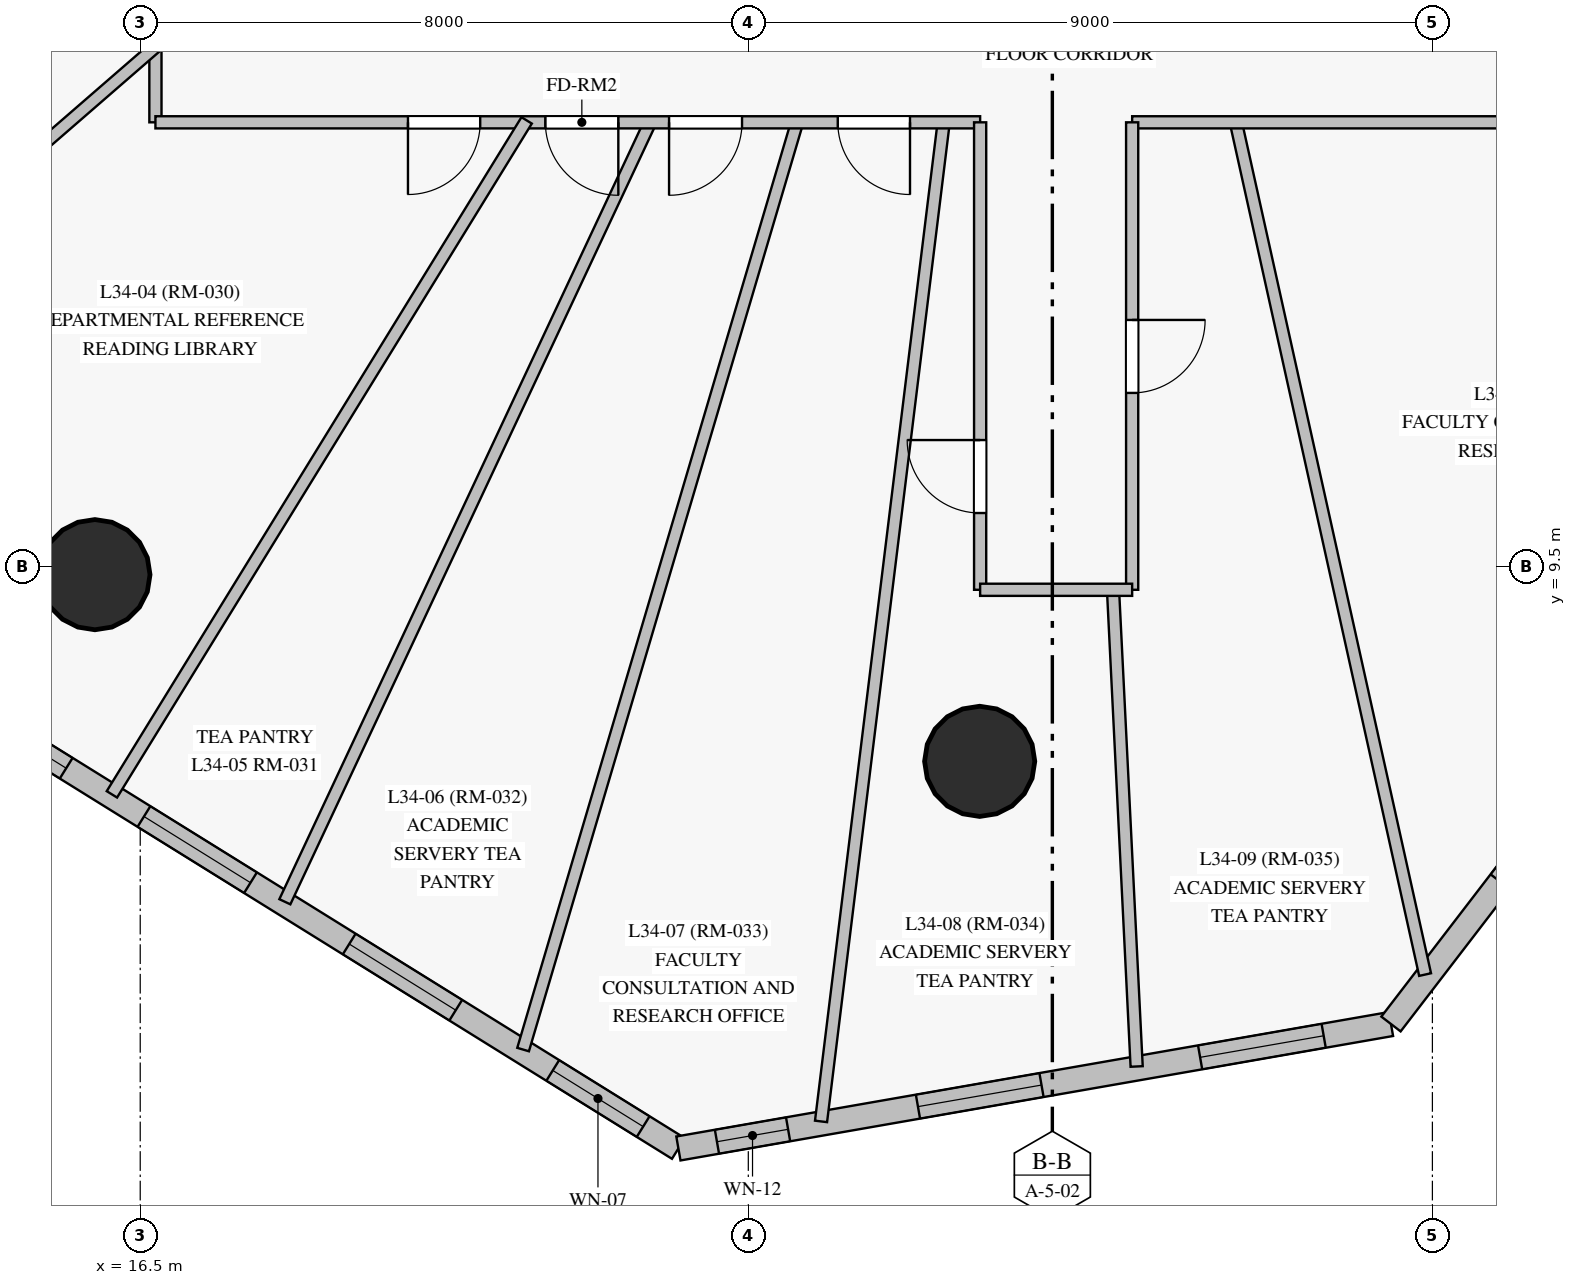
"""IFC4 building model, lengths in metres.
Left out: names, types, materials, properties, quantities, classifications, styles, units other than length and angle.
Written with IfcOpenShell. Run it as: python <this file> out.ifc"""

import sys

from ifc_helpers import new_model, si_unit, direction, frame, frame_2d, origin, origin_with_axes, origin_2d, place, context, subcontext, project, spatial, rectangle, circle, extrude, source, transform, mapped, element, fill, save


model = new_model("IFC4")
c1 = context("Model", 3, precision=1e-05, world=origin(), true_north=direction((0.0, 1.0)))
c2 = subcontext(c1, "Body", "Model", "MODEL_VIEW")
j1 = project(units=[si_unit("LENGTHUNIT", "METRE"), si_unit("PLANEANGLEUNIT", "RADIAN")], contexts=[c1])
p1 = place(None, origin())
s1 = spatial("IfcSite", under=j1, at=p1, CompositionType="ELEMENT")
p2 = place(p1, origin())
s2 = spatial("IfcBuilding", under=s1, at=p2, CompositionType="ELEMENT")
p3 = place(p2, frame((0.0, 0.0, 123.65)))
s3 = spatial("IfcBuildingStorey", under=s2, at=p3, CompositionType="ELEMENT", Elevation=123.65)
m1 = source(origin_with_axes(), c2, "Body", "SweptSolid", [
    extrude(circle(Radius=0.725, at=origin_2d()), origin(), (0.0, 0.0, 1.0), 3.05),
])
for number, where, z_axis, x_axis in (
    (1, (15.904, 9.399, 0.0), (0.0, 0.0, 1.0), (1.0, 0.0, 0.0)),
    (2, (27.544, 6.943, 0.0), (0.0, 0.0, 1.0), (1.0, 0.0, 0.0)),
):
    element("IfcColumn", number, at=place(p3, frame(where, z_axis=z_axis, x_axis=x_axis)), inside=s3, PredefinedType="COLUMN", context=c2, shape_type="MappedRepresentation", body=[
        mapped(m1, transform((0.0, 0.0, 0.0), scale=1.0)),
    ])
p4 = place(p3, frame((13.486, 8.12, 0.0), z_axis=(0.0, 0.0, 1.0), x_axis=(0.849467759899, -0.527640526204, 0.0)))
e3 = element("IfcWall", 3, at=p4, inside=s3, PredefinedType="SOLIDWALL", context=c2, shape_type="SweptSolid", body=[
    extrude(rectangle(XDim=11.884, YDim=0.32, at=frame_2d((5.942, 0.0))), origin(), (0.0, 0.0, 1.0), 2.825),
])
p5 = place(p4, frame((0.752, 0.0, 0.85)))
e4 = element("IfcOpeningElement", 4, at=p5, cuts=e3, PredefinedType="OPENING", context=c2, shape_type="SweptSolid", body=[
    extrude(rectangle(XDim=1.65, YDim=1.65, at=frame_2d((0.825, 0.825))), frame((0.0, 0.17, 0.0), z_axis=(0.0, -1.0, 0.0), x_axis=(1.0, 0.0, 0.0)), (0.0, 0.0, 1.0), 0.34),
])
p6 = place(p4, frame((3.607, 0.0, 0.85)))
e5 = element("IfcOpeningElement", 5, at=p6, cuts=e3, PredefinedType="OPENING", context=c2, shape_type="SweptSolid", body=[
    extrude(rectangle(XDim=1.65, YDim=1.65, at=frame_2d((0.825, 0.825))), frame((0.0, 0.17, 0.0), z_axis=(0.0, -1.0, 0.0), x_axis=(1.0, 0.0, 0.0)), (0.0, 0.0, 1.0), 0.34),
])
p7 = place(p4, frame((6.786, 0.0, 0.85)))
e6 = element("IfcOpeningElement", 6, at=p7, cuts=e3, PredefinedType="OPENING", context=c2, shape_type="SweptSolid", body=[
    extrude(rectangle(XDim=1.65, YDim=1.65, at=frame_2d((0.825, 0.825))), frame((0.0, 0.17, 0.0), z_axis=(0.0, -1.0, 0.0), x_axis=(1.0, 0.0, 0.0)), (0.0, 0.0, 1.0), 0.34),
])
p8 = place(p4, frame((9.938, 0.0, 0.85)))
e7 = element("IfcOpeningElement", 7, at=p8, cuts=e3, PredefinedType="OPENING", context=c2, shape_type="SweptSolid", body=[
    extrude(rectangle(XDim=1.4, YDim=1.65, at=frame_2d((0.7, 0.825))), frame((0.0, 0.17, 0.0), z_axis=(0.0, -1.0, 0.0), x_axis=(1.0, 0.0, 0.0)), (0.0, 0.0, 1.0), 0.34),
])
p9 = place(p3, frame((23.58, 1.85, 0.0), z_axis=(0.0, 0.0, 1.0), x_axis=(0.985090629545, 0.172036192654, 0.0)))
e8 = element("IfcWall", 8, at=p9, inside=s3, PredefinedType="SOLIDWALL", context=c2, shape_type="SweptSolid", body=[
    extrude(rectangle(XDim=9.517, YDim=0.32, at=frame_2d((4.758, 0.0))), origin(), (0.0, 0.0, 1.0), 2.825),
])
p10 = place(p9, frame((0.515, 0.0, 0.85)))
e9 = element("IfcOpeningElement", 9, at=p10, cuts=e8, PredefinedType="OPENING", context=c2, shape_type="SweptSolid", body=[
    extrude(rectangle(XDim=0.95, YDim=1.5, at=frame_2d((0.475, 0.75))), frame((0.0, 0.17, 0.0), z_axis=(0.0, -1.0, 0.0), x_axis=(1.0, 0.0, 0.0)), (0.0, 0.0, 1.0), 0.34),
])
p11 = place(p9, frame((3.199, 0.0, 0.85)))
e10 = element("IfcOpeningElement", 10, at=p11, cuts=e8, PredefinedType="OPENING", context=c2, shape_type="SweptSolid", body=[
    extrude(rectangle(XDim=1.65, YDim=1.65, at=frame_2d((0.825, 0.825))), frame((0.0, 0.17, 0.0), z_axis=(0.0, -1.0, 0.0), x_axis=(1.0, 0.0, 0.0)), (0.0, 0.0, 1.0), 0.34),
])
p12 = place(p9, frame((6.968, 0.0, 0.85)))
e11 = element("IfcOpeningElement", 11, at=p12, cuts=e8, PredefinedType="OPENING", context=c2, shape_type="SweptSolid", body=[
    extrude(rectangle(XDim=1.65, YDim=1.65, at=frame_2d((0.825, 0.825))), frame((0.0, 0.17, 0.0), z_axis=(0.0, -1.0, 0.0), x_axis=(1.0, 0.0, 0.0)), (0.0, 0.0, 1.0), 0.34),
])
p13 = place(p3, frame((32.955, 3.487, 0.0), z_axis=(0.0, 0.0, 1.0), x_axis=(0.608995925668, 0.793173349603, 0.0)))
e12 = element("IfcWall", 12, at=p13, inside=s3, PredefinedType="SOLIDWALL", context=c2, shape_type="SweptSolid", body=[
    extrude(rectangle(XDim=14.199, YDim=0.32, at=frame_2d((7.1, 0.0))), origin(), (0.0, 0.0, 1.0), 2.825),
])
p14 = place(p13, frame((2.36, 0.0, 0.85)))
e13 = element("IfcOpeningElement", 13, at=p14, cuts=e12, PredefinedType="OPENING", context=c2, shape_type="SweptSolid", body=[
    extrude(rectangle(XDim=1.65, YDim=1.65, at=frame_2d((0.825, 0.825))), frame((0.0, 0.17, 0.0), z_axis=(0.0, -1.0, 0.0), x_axis=(1.0, 0.0, 0.0)), (0.0, 0.0, 1.0), 0.34),
])
p15 = place(p13, frame((6.467, 0.0, 0.85)))
e14 = element("IfcOpeningElement", 14, at=p15, cuts=e12, PredefinedType="OPENING", context=c2, shape_type="SweptSolid", body=[
    extrude(rectangle(XDim=1.65, YDim=1.65, at=frame_2d((0.825, 0.825))), frame((0.0, 0.17, 0.0), z_axis=(0.0, -1.0, 0.0), x_axis=(1.0, 0.0, 0.0)), (0.0, 0.0, 1.0), 0.34),
])
p16 = place(p13, frame((10.573, 0.0, 0.85)))
e15 = element("IfcOpeningElement", 15, at=p16, cuts=e12, PredefinedType="OPENING", context=c2, shape_type="SweptSolid", body=[
    extrude(rectangle(XDim=1.65, YDim=1.65, at=frame_2d((0.825, 0.825))), frame((0.0, 0.17, 0.0), z_axis=(0.0, -1.0, 0.0), x_axis=(1.0, 0.0, 0.0)), (0.0, 0.0, 1.0), 0.34),
])
p17 = place(p3, frame((16.7, 15.35, 0.0), z_axis=(0.0, 0.0, 1.0), x_axis=(0.0, 1.0, 0.0)))
e16 = element("IfcWall", 16, at=p17, inside=s3, PredefinedType="PARTITIONING", context=c2, shape_type="SweptSolid", body=[
    extrude(rectangle(XDim=22.3, YDim=0.16, at=frame_2d((11.15, 0.0))), origin(), (0.0, 0.0, 1.0), 2.225),
])
p18 = place(p17, frame((10.235, 0.0, 0.0)))
e17 = element("IfcOpeningElement", 17, at=p18, cuts=e16, PredefinedType="OPENING", context=c2, shape_type="SweptSolid", body=[
    extrude(rectangle(XDim=0.95, YDim=2.15, at=frame_2d((0.475, 1.075))), frame((0.0, 0.09, 0.0), z_axis=(0.0, -1.0, 0.0), x_axis=(1.0, 0.0, 0.0)), (0.0, 0.0, 1.0), 0.18),
])
p19 = place(p17, frame((7.33, 0.0, 0.0)))
e18 = element("IfcOpeningElement", 18, at=p19, cuts=e16, PredefinedType="OPENING", context=c2, shape_type="SweptSolid", body=[
    extrude(rectangle(XDim=0.96, YDim=2.15, at=frame_2d((0.48, 1.075))), frame((0.0, 0.09, 0.0), z_axis=(0.0, -1.0, 0.0), x_axis=(1.0, 0.0, 0.0)), (0.0, 0.0, 1.0), 0.18),
])
p20 = place(p17, frame((2.613, 0.0, 0.0)))
e19 = element("IfcOpeningElement", 19, at=p20, cuts=e16, PredefinedType="OPENING", context=c2, shape_type="SweptSolid", body=[
    extrude(rectangle(XDim=0.95, YDim=2.15, at=frame_2d((0.475, 1.075))), frame((0.0, 0.09, 0.0), z_axis=(0.0, -1.0, 0.0), x_axis=(1.0, 0.0, 0.0)), (0.0, 0.0, 1.0), 0.18),
])
p21 = place(p17, frame((14.36, 0.0, 0.0)))
e20 = element("IfcOpeningElement", 20, at=p21, cuts=e16, PredefinedType="OPENING", context=c2, shape_type="SweptSolid", body=[
    extrude(rectangle(XDim=0.95, YDim=2.15, at=frame_2d((0.475, 1.075))), frame((0.0, 0.09, 0.0), z_axis=(0.0, -1.0, 0.0), x_axis=(1.0, 0.0, 0.0)), (0.0, 0.0, 1.0), 0.18),
])
p22 = place(p17, frame((12.296, 0.0, 0.0)))
e21 = element("IfcOpeningElement", 21, at=p22, cuts=e16, PredefinedType="OPENING", context=c2, shape_type="SweptSolid", body=[
    extrude(rectangle(XDim=0.95, YDim=2.15, at=frame_2d((0.475, 1.075))), frame((0.0, 0.09, 0.0), z_axis=(0.0, -1.0, 0.0), x_axis=(1.0, 0.0, 0.0)), (0.0, 0.0, 1.0), 0.18),
])
p23 = place(p3, frame((27.074, 15.38, 0.0), z_axis=(0.0, 0.0, 1.0), x_axis=(-0.121861100073, -0.992547163761, 0.0)))
e22 = element("IfcWall", 22, at=p23, inside=s3, PredefinedType="PARTITIONING", context=c2, shape_type="SweptSolid", body=[
    extrude(rectangle(XDim=13.273, YDim=0.16, at=frame_2d((6.636, 0.0))), origin(), (0.0, 0.0, 1.0), 2.225),
])
p24 = place(p3, frame((25.151, 15.379, 0.0), z_axis=(0.0, 0.0, 1.0), x_axis=(-0.283419382295, -0.958996065549, 0.0)))
e23 = element("IfcWall", 23, at=p24, inside=s3, PredefinedType="PARTITIONING", context=c2, shape_type="SweptSolid", body=[
    extrude(rectangle(XDim=12.75, YDim=0.16, at=frame_2d((6.375, 0.0))), origin(), (0.0, 0.0, 1.0), 2.825),
])
p25 = place(p3, frame((30.908, 15.379, 0.0), z_axis=(0.0, 0.0, 1.0), x_axis=(0.216759848163, -0.976224957796, 0.0)))
e24 = element("IfcWall", 24, at=p25, inside=s3, PredefinedType="PARTITIONING", context=c2, shape_type="SweptSolid", body=[
    extrude(rectangle(XDim=11.515, YDim=0.16, at=frame_2d((5.758, 0.0))), origin(), (0.0, 0.0, 1.0), 2.825),
])
p26 = place(p3, frame((23.221, 15.377, 0.0), z_axis=(0.0, 0.0, 1.0), x_axis=(-0.424355098635, -0.905495858777, 0.0)))
e25 = element("IfcWall", 25, at=p26, inside=s3, PredefinedType="PARTITIONING", context=c2, shape_type="SweptSolid", body=[
    extrude(rectangle(XDim=11.354, YDim=0.16, at=frame_2d((5.677, 0.0))), origin(), (0.0, 0.0, 1.0), 2.825),
])
p27 = place(p3, frame((27.55, 15.35, 0.0), z_axis=(0.0, 0.0, 1.0), x_axis=(-1.0, 0.0, 0.0)))
e26 = element("IfcWall", 26, at=p27, inside=s3, PredefinedType="PARTITIONING", context=c2, shape_type="SweptSolid", body=[
    extrude(rectangle(XDim=10.85, YDim=0.16, at=frame_2d((5.425, 0.0))), origin(), (0.0, 0.0, 1.0), 2.325),
])
p28 = place(p27, frame((6.577, 0.0, 0.0)))
e27 = element("IfcOpeningElement", 27, at=p28, cuts=e26, PredefinedType="OPENING", context=c2, shape_type="SweptSolid", body=[
    extrude(rectangle(XDim=0.95, YDim=2.15, at=frame_2d((0.475, 1.075))), frame((0.0, 0.09, 0.0), z_axis=(0.0, -1.0, 0.0), x_axis=(1.0, 0.0, 0.0)), (0.0, 0.0, 1.0), 0.18),
])
p29 = place(p27, frame((4.76, 0.0, 0.0)))
e28 = element("IfcOpeningElement", 28, at=p29, cuts=e26, PredefinedType="OPENING", context=c2, shape_type="SweptSolid", body=[
    extrude(rectangle(XDim=0.96, YDim=2.15, at=frame_2d((0.48, 1.075))), frame((0.0, 0.09, 0.0), z_axis=(0.0, -1.0, 0.0), x_axis=(1.0, 0.0, 0.0)), (0.0, 0.0, 1.0), 0.18),
])
p30 = place(p27, frame((3.133, 0.0, 0.0)))
e29 = element("IfcOpeningElement", 29, at=p30, cuts=e26, PredefinedType="OPENING", context=c2, shape_type="SweptSolid", body=[
    extrude(rectangle(XDim=0.96, YDim=2.15, at=frame_2d((0.48, 1.075))), frame((0.0, 0.09, 0.0), z_axis=(0.0, -1.0, 0.0), x_axis=(1.0, 0.0, 0.0)), (0.0, 0.0, 1.0), 0.18),
])
p31 = place(p27, frame((0.923, 0.0, 0.0)))
e30 = element("IfcOpeningElement", 30, at=p31, cuts=e26, PredefinedType="OPENING", context=c2, shape_type="SweptSolid", body=[
    extrude(rectangle(XDim=0.95, YDim=2.15, at=frame_2d((0.475, 1.075))), frame((0.0, 0.09, 0.0), z_axis=(0.0, -1.0, 0.0), x_axis=(1.0, 0.0, 0.0)), (0.0, 0.0, 1.0), 0.18),
])
p32 = place(p3, frame((40.2, 15.35, 0.0), z_axis=(0.0, 0.0, 1.0), x_axis=(-1.0, 0.0, 0.0)))
e31 = element("IfcWall", 31, at=p32, inside=s3, PredefinedType="PARTITIONING", context=c2, shape_type="SweptSolid", body=[
    extrude(rectangle(XDim=10.65, YDim=0.16, at=frame_2d((5.325, 0.0))), origin(), (0.0, 0.0, 1.0), 2.225),
])
p33 = place(p32, frame((4.85, 0.0, 0.0)))
e32 = element("IfcOpeningElement", 32, at=p33, cuts=e31, PredefinedType="OPENING", context=c2, shape_type="SweptSolid", body=[
    extrude(rectangle(XDim=0.95, YDim=2.15, at=frame_2d((0.475, 1.075))), frame((0.0, 0.09, 0.0), z_axis=(0.0, -1.0, 0.0), x_axis=(1.0, 0.0, 0.0)), (0.0, 0.0, 1.0), 0.18),
])
p34 = place(p3, frame((21.584, 15.375, 0.0), z_axis=(0.0, 0.0, 1.0), x_axis=(-0.524088266977, -0.851663952752, 0.0)))
e33 = element("IfcWall", 33, at=p34, inside=s3, PredefinedType="PARTITIONING", context=c2, shape_type="SweptSolid", body=[
    extrude(rectangle(XDim=10.411, YDim=0.16, at=frame_2d((5.206, 0.0))), origin(), (0.0, 0.0, 1.0), 2.825),
])
p35 = place(p3, frame((16.723, 16.361, 0.0), z_axis=(0.0, 0.0, 1.0), x_axis=(-0.755325795134, -0.655349481731, 0.0)))
e34 = element("IfcWall", 34, at=p35, inside=s3, PredefinedType="PARTITIONING", context=c2, shape_type="SweptSolid", body=[
    extrude(rectangle(XDim=6.943, YDim=0.16, at=frame_2d((3.471, 0.0))), origin(), (0.0, 0.0, 1.0), 2.225),
])
p36 = place(p3, frame((29.297, 9.23, 0.0), z_axis=(0.0, 0.0, 1.0), x_axis=(0.049532306397, -0.99877252196, 0.0)))
e35 = element("IfcWall", 35, at=p36, inside=s3, PredefinedType="PARTITIONING", context=c2, shape_type="SweptSolid", body=[
    extrude(rectangle(XDim=6.309, YDim=0.16, at=frame_2d((3.155, 0.0))), origin(), (0.0, 0.0, 1.0), 2.825),
])
p37 = place(p3, frame((29.55, 15.35, 0.0), z_axis=(0.0, 0.0, 1.0), x_axis=(0.0, -1.0, 0.0)))
e36 = element("IfcWall", 36, at=p37, inside=s3, PredefinedType="PARTITIONING", context=c2, shape_type="SweptSolid", body=[
    extrude(rectangle(XDim=6.15, YDim=0.16, at=frame_2d((3.075, 0.0))), origin(), (0.0, 0.0, 1.0), 2.825),
])
p38 = place(p37, frame((2.6, 0.0, 0.0)))
e37 = element("IfcOpeningElement", 37, at=p38, cuts=e36, PredefinedType="OPENING", context=c2, shape_type="SweptSolid", body=[
    extrude(rectangle(XDim=0.96, YDim=2.15, at=frame_2d((0.48, 1.075))), frame((0.0, 0.09, 0.0), z_axis=(0.0, -1.0, 0.0), x_axis=(1.0, 0.0, 0.0)), (0.0, 0.0, 1.0), 0.18),
])
p39 = place(p3, frame((27.55, 9.2, 0.0), z_axis=(0.0, 0.0, 1.0), x_axis=(0.0, 1.0, 0.0)))
e38 = element("IfcWall", 38, at=p39, inside=s3, PredefinedType="PARTITIONING", context=c2, shape_type="SweptSolid", body=[
    extrude(rectangle(XDim=6.15, YDim=0.16, at=frame_2d((3.075, 0.0))), origin(), (0.0, 0.0, 1.0), 2.225),
])
p40 = place(p39, frame((1.01, 0.0, 0.0)))
e39 = element("IfcOpeningElement", 39, at=p40, cuts=e38, PredefinedType="OPENING", context=c2, shape_type="SweptSolid", body=[
    extrude(rectangle(XDim=0.96, YDim=2.15, at=frame_2d((0.48, 1.075))), frame((0.0, 0.09, 0.0), z_axis=(0.0, -1.0, 0.0), x_axis=(1.0, 0.0, 0.0)), (0.0, 0.0, 1.0), 0.18),
])
p41 = place(p3, frame((29.55, 9.2, 0.0), z_axis=(0.0, 0.0, 1.0), x_axis=(-1.0, 0.0, 0.0)))
e40 = element("IfcWall", 40, at=p41, inside=s3, PredefinedType="PARTITIONING", context=c2, shape_type="SweptSolid", body=[
    extrude(rectangle(XDim=2.0, YDim=0.16, at=frame_2d((1.0, 0.0))), origin(), (0.0, 0.0, 1.0), 2.325),
])
m2 = source(origin_with_axes(), c2, "Body", "SweptSolid", [
    extrude(rectangle(XDim=1.65, YDim=1.65, at=frame_2d((0.825, 0.825))), frame((0.0, 0.03, 0.0), z_axis=(0.0, -1.0, 0.0), x_axis=(1.0, 0.0, 0.0)), (0.0, 0.0, 1.0), 0.06),
])
p42 = place(p5, origin())
e41 = element("IfcWindow", 41, at=p42, inside=s3, PartitioningType="SINGLE_PANEL", PredefinedType="WINDOW", context=c2, shape_type="MappedRepresentation", body=[
    mapped(m2, transform((0.0, 0.0, 0.0), scale=1.0)),
])
fill(e4, e41)
p43 = place(p6, origin())
e42 = element("IfcWindow", 42, at=p43, inside=s3, PartitioningType="SINGLE_PANEL", PredefinedType="WINDOW", context=c2, shape_type="MappedRepresentation", body=[
    mapped(m2, transform((0.0, 0.0, 0.0), scale=1.0)),
])
fill(e5, e42)
p44 = place(p7, origin())
e43 = element("IfcWindow", 43, at=p44, inside=s3, PartitioningType="SINGLE_PANEL", PredefinedType="WINDOW", context=c2, shape_type="MappedRepresentation", body=[
    mapped(m2, transform((0.0, 0.0, 0.0), scale=1.0)),
])
fill(e6, e43)
m3 = source(origin_with_axes(), c2, "Body", "SweptSolid", [
    extrude(rectangle(XDim=1.4, YDim=1.65, at=frame_2d((0.7, 0.825))), frame((0.0, 0.03, 0.0), z_axis=(0.0, -1.0, 0.0), x_axis=(1.0, 0.0, 0.0)), (0.0, 0.0, 1.0), 0.06),
])
p45 = place(p8, origin())
e44 = element("IfcWindow", 44, at=p45, inside=s3, PartitioningType="SINGLE_PANEL", PredefinedType="WINDOW", context=c2, shape_type="MappedRepresentation", body=[
    mapped(m3, transform((0.0, 0.0, 0.0), scale=1.0)),
])
fill(e7, e44)
m4 = source(origin_with_axes(), c2, "Body", "SweptSolid", [
    extrude(rectangle(XDim=0.95, YDim=1.5, at=frame_2d((0.475, 0.75))), frame((0.0, 0.03, 0.0), z_axis=(0.0, -1.0, 0.0), x_axis=(1.0, 0.0, 0.0)), (0.0, 0.0, 1.0), 0.06),
])
p46 = place(p10, origin())
e45 = element("IfcWindow", 45, at=p46, inside=s3, PartitioningType="SINGLE_PANEL", PredefinedType="WINDOW", context=c2, shape_type="MappedRepresentation", body=[
    mapped(m4, transform((0.0, 0.0, 0.0), scale=1.0)),
])
fill(e9, e45)
p47 = place(p11, origin())
e46 = element("IfcWindow", 46, at=p47, inside=s3, PartitioningType="SINGLE_PANEL", PredefinedType="WINDOW", context=c2, shape_type="MappedRepresentation", body=[
    mapped(m2, transform((0.0, 0.0, 0.0), scale=1.0)),
])
fill(e10, e46)
p48 = place(p12, origin())
e47 = element("IfcWindow", 47, at=p48, inside=s3, PartitioningType="SINGLE_PANEL", PredefinedType="WINDOW", context=c2, shape_type="MappedRepresentation", body=[
    mapped(m2, transform((0.0, 0.0, 0.0), scale=1.0)),
])
fill(e11, e47)
m5 = source(origin_with_axes(), c2, "Body", "SweptSolid", [
    extrude(rectangle(XDim=0.95, YDim=2.15, at=frame_2d((0.475, 1.075))), frame((0.0, 0.025, 0.0), z_axis=(0.0, -1.0, 0.0), x_axis=(1.0, 0.0, 0.0)), (0.0, 0.0, 1.0), 0.05),
])
p49 = place(p28, origin())
e48 = element("IfcDoor", 48, at=p49, inside=s3, OperationType="SINGLE_SWING_RIGHT", PredefinedType="DOOR", context=c2, shape_type="MappedRepresentation", body=[
    mapped(m5, transform((0.0, 0.0, 0.0), scale=1.0)),
])
fill(e27, e48)
m6 = source(origin_with_axes(), c2, "Body", "SweptSolid", [
    extrude(rectangle(XDim=0.96, YDim=2.15, at=frame_2d((0.48, 1.075))), frame((0.0, 0.025, 0.0), z_axis=(0.0, -1.0, 0.0), x_axis=(1.0, 0.0, 0.0)), (0.0, 0.0, 1.0), 0.05),
])
p50 = place(p29, origin())
e49 = element("IfcDoor", 49, at=p50, inside=s3, OperationType="SINGLE_SWING_LEFT", PredefinedType="DOOR", context=c2, shape_type="MappedRepresentation", body=[
    mapped(m6, transform((0.0, 0.0, 0.0), scale=1.0)),
])
fill(e28, e49)
p51 = place(p30, origin())
e50 = element("IfcDoor", 50, at=p51, inside=s3, OperationType="SINGLE_SWING_RIGHT", PredefinedType="DOOR", context=c2, shape_type="MappedRepresentation", body=[
    mapped(m6, transform((0.0, 0.0, 0.0), scale=1.0)),
])
fill(e29, e50)
p52 = place(p31, origin())
e51 = element("IfcDoor", 51, at=p52, inside=s3, OperationType="SINGLE_SWING_LEFT", PredefinedType="DOOR", context=c2, shape_type="MappedRepresentation", body=[
    mapped(m5, transform((0.0, 0.0, 0.0), scale=1.0)),
])
fill(e30, e51)
p53 = place(p40, origin())
e52 = element("IfcDoor", 52, at=p53, inside=s3, OperationType="SINGLE_SWING_RIGHT", PredefinedType="DOOR", context=c2, shape_type="MappedRepresentation", body=[
    mapped(m6, transform((0.0, 0.0, 0.0), scale=1.0)),
])
fill(e39, e52)
p54 = place(p38, origin())
e53 = element("IfcDoor", 53, at=p54, inside=s3, OperationType="SINGLE_SWING_LEFT", PredefinedType="DOOR", context=c2, shape_type="MappedRepresentation", body=[
    mapped(m6, transform((0.0, 0.0, 0.0), scale=1.0)),
])
fill(e37, e53)
save(model, sys.argv[1])
